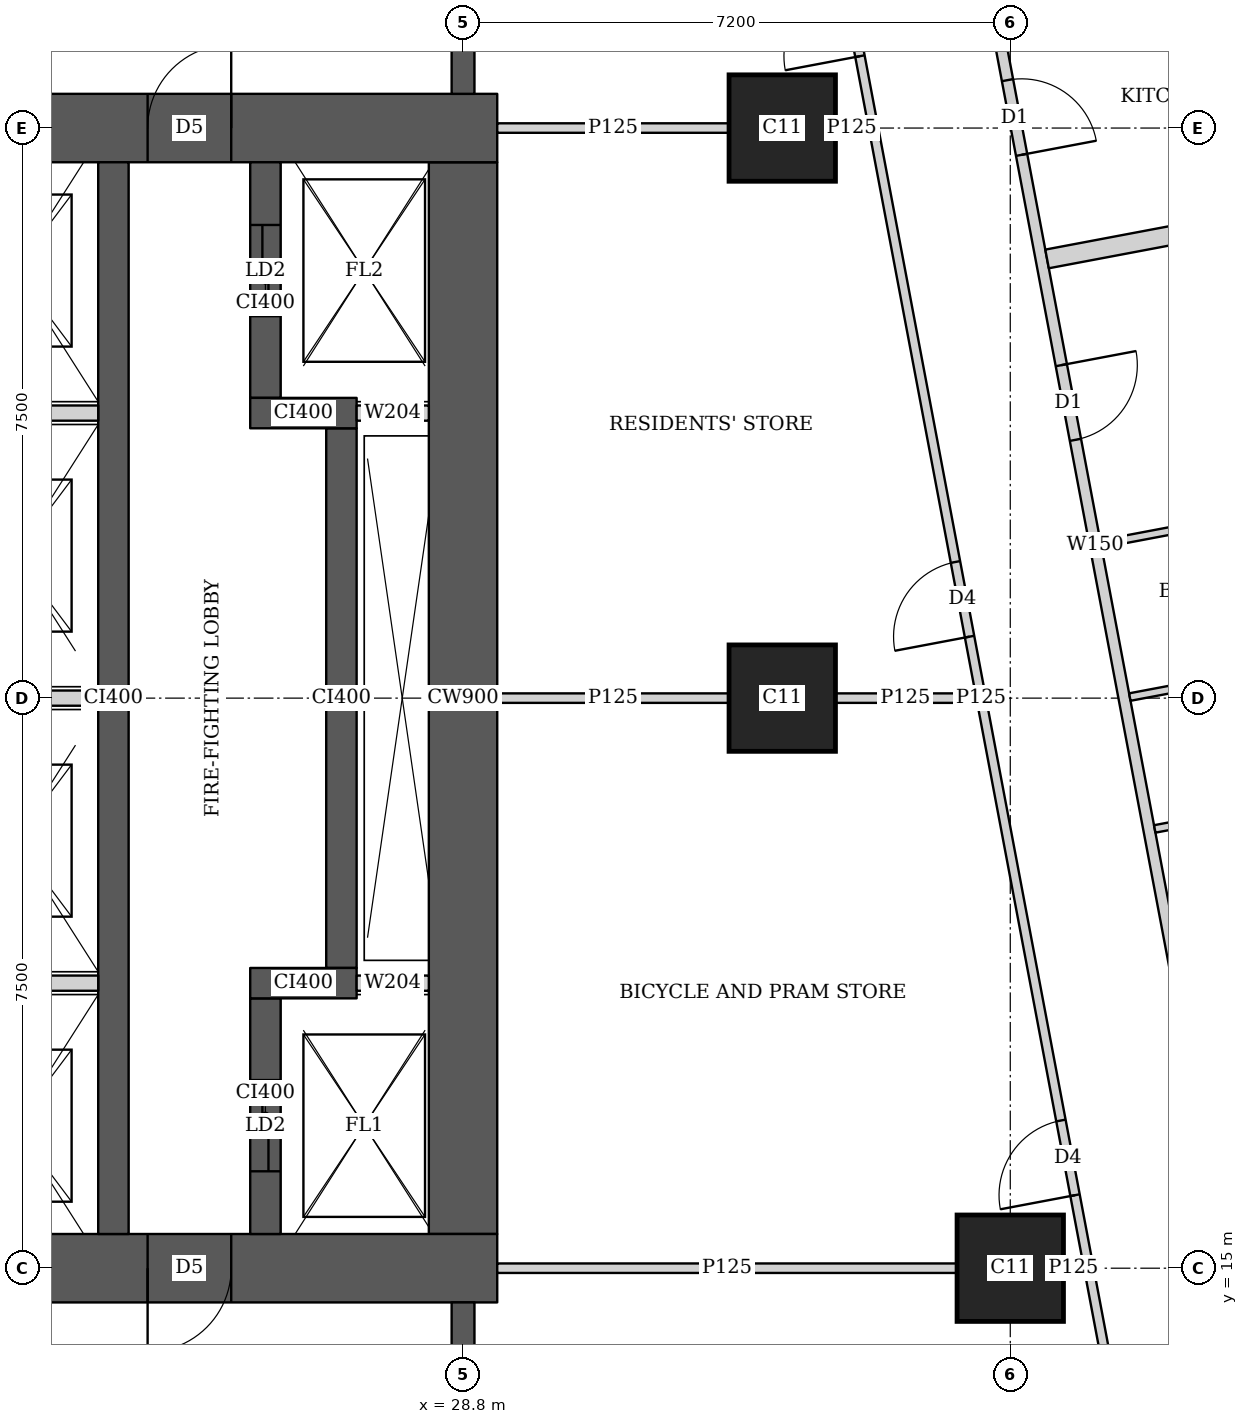
"""IFC4 building model, lengths in metres.
Left out: names, types, materials, properties, quantities, classifications, styles, units other than length and angle.
Written with IfcOpenShell. Run it as: python <this file> out.ifc"""

import sys

from ifc_helpers import new_model, si_unit, direction, frame, frame_2d, origin, origin_2d, place, context, subcontext, project, spatial, rectangle, extrude, element, fill, save


model = new_model("IFC4")
c1 = context("Model", 3, precision=1e-05, world=origin(), true_north=direction((0.0, 1.0)))
c2 = subcontext(c1, "Body", "Model", "MODEL_VIEW")
j1 = project(units=[si_unit("LENGTHUNIT", "METRE"), si_unit("PLANEANGLEUNIT", "RADIAN")], contexts=[c1])
p1 = place(None, origin())
s1 = spatial("IfcSite", under=j1, at=p1, CompositionType="ELEMENT")
p2 = place(p1, origin())
s2 = spatial("IfcBuilding", under=s1, at=p2, CompositionType="ELEMENT")
p3 = place(p2, frame((0.0, 0.0, 277.85)))
s3 = spatial("IfcBuildingStorey", under=s2, at=p3, CompositionType="ELEMENT", Elevation=277.85)
for number, where, z_axis, x_axis in (
    (1, (36.0, 15.0, 0.0), (0.0, 0.0, 1.0), (1.0, 0.0, 0.0)),
    (2, (33.0, 22.5, 0.0), (0.0, 0.0, 1.0), (1.0, 0.0, 0.0)),
    (3, (33.0, 30.0, 0.0), (0.0, 0.0, 1.0), (1.0, 0.0, 0.0)),
):
    element("IfcColumn", number, at=place(p3, frame(where, z_axis=z_axis, x_axis=x_axis)), inside=s3, PredefinedType="COLUMN", context=c2, shape_type="SweptSolid", body=[
        extrude(rectangle(XDim=1.4, YDim=1.4, at=origin_2d()), origin(), (0.0, 0.0, 1.0), 3.75),
    ])
p4 = place(p3, frame((13.95, 15.0, 0.0), z_axis=(0.0, 0.0, 1.0), x_axis=(1.0, 0.0, 0.0)))
e4 = element("IfcWall", 4, at=p4, inside=s3, PredefinedType="SHEAR", context=c2, shape_type="SweptSolid", body=[
    extrude(rectangle(XDim=15.3, YDim=0.9, at=frame_2d((7.65, 0.0))), origin(), (0.0, 0.0, 1.0), 3.75),
])
p5 = place(p4, frame((4.45, 0.0, 0.0)))
e5 = element("IfcOpeningElement", 5, at=p5, cuts=e4, PredefinedType="OPENING", context=c2, shape_type="SweptSolid", body=[
    extrude(rectangle(XDim=1.8, YDim=2.1, at=frame_2d((0.9, 1.05))), frame((0.0, 0.46, 0.0), z_axis=(0.0, -1.0, 0.0), x_axis=(1.0, 0.0, 0.0)), (0.0, 0.0, 1.0), 0.92),
])
p6 = place(p4, frame((10.7, 0.0, 0.0)))
e6 = element("IfcOpeningElement", 6, at=p6, cuts=e4, PredefinedType="OPENING", context=c2, shape_type="SweptSolid", body=[
    extrude(rectangle(XDim=1.1, YDim=2.1, at=frame_2d((0.55, 1.05))), frame((0.0, 0.46, 0.0), z_axis=(0.0, -1.0, 0.0), x_axis=(1.0, 0.0, 0.0)), (0.0, 0.0, 1.0), 0.92),
])
p7 = place(p3, frame((13.95, 30.0, 0.0), z_axis=(0.0, 0.0, 1.0), x_axis=(1.0, 0.0, 0.0)))
e7 = element("IfcWall", 7, at=p7, inside=s3, PredefinedType="SHEAR", context=c2, shape_type="SweptSolid", body=[
    extrude(rectangle(XDim=15.3, YDim=0.9, at=frame_2d((7.65, 0.0))), origin(), (0.0, 0.0, 1.0), 3.75),
])
p8 = place(p7, frame((4.45, 0.0, 0.0)))
e8 = element("IfcOpeningElement", 8, at=p8, cuts=e7, PredefinedType="OPENING", context=c2, shape_type="SweptSolid", body=[
    extrude(rectangle(XDim=1.8, YDim=2.1, at=frame_2d((0.9, 1.05))), frame((0.0, 0.46, 0.0), z_axis=(0.0, -1.0, 0.0), x_axis=(1.0, 0.0, 0.0)), (0.0, 0.0, 1.0), 0.92),
])
p9 = place(p7, frame((10.7, 0.0, 0.0)))
e9 = element("IfcOpeningElement", 9, at=p9, cuts=e7, PredefinedType="OPENING", context=c2, shape_type="SweptSolid", body=[
    extrude(rectangle(XDim=1.1, YDim=2.1, at=frame_2d((0.55, 1.05))), frame((0.0, 0.46, 0.0), z_axis=(0.0, -1.0, 0.0), x_axis=(1.0, 0.0, 0.0)), (0.0, 0.0, 1.0), 0.92),
])
p10 = place(p3, frame((28.8, 15.45, 0.0), z_axis=(0.0, 0.0, 1.0), x_axis=(0.0, 1.0, 0.0)))
e10 = element("IfcWall", 10, at=p10, inside=s3, PredefinedType="SHEAR", context=c2, shape_type="SweptSolid", body=[
    extrude(rectangle(XDim=14.1, YDim=0.9, at=frame_2d((7.05, 0.0))), origin(), (0.0, 0.0, 1.0), 3.75),
])
p11 = place(p3, frame((24.2, 15.45, 0.0), z_axis=(0.0, 0.0, 1.0), x_axis=(0.0, 1.0, 0.0)))
e11 = element("IfcWall", 11, at=p11, inside=s3, PredefinedType="SHEAR", context=c2, shape_type="SweptSolid", body=[
    extrude(rectangle(XDim=14.1, YDim=0.4, at=frame_2d((7.05, 0.0))), origin(), (0.0, 0.0, 1.0), 3.75),
])
p12 = place(p3, frame((26.2, 15.45, 0.0), z_axis=(0.0, 0.0, 1.0), x_axis=(0.0, 1.0, 0.0)))
e12 = element("IfcWall", 12, at=p12, inside=s3, PredefinedType="SHEAR", context=c2, shape_type="SweptSolid", body=[
    extrude(rectangle(XDim=3.1, YDim=0.4, at=frame_2d((1.55, 0.0))), origin(), (0.0, 0.0, 1.0), 3.75),
])
p13 = place(p12, frame((0.825, 0.0, 0.0)))
e13 = element("IfcOpeningElement", 13, at=p13, cuts=e12, PredefinedType="OPENING", context=c2, shape_type="SweptSolid", body=[
    extrude(rectangle(XDim=1.2, YDim=2.1, at=frame_2d((0.6, 1.05))), frame((0.0, 0.21, 0.0), z_axis=(0.0, -1.0, 0.0), x_axis=(1.0, 0.0, 0.0)), (0.0, 0.0, 1.0), 0.42),
])
p14 = place(p3, frame((26.0, 18.75, 0.0), z_axis=(0.0, 0.0, 1.0), x_axis=(1.0, 0.0, 0.0)))
e14 = element("IfcWall", 14, at=p14, inside=s3, PredefinedType="SHEAR", context=c2, shape_type="SweptSolid", body=[
    extrude(rectangle(XDim=1.4, YDim=0.4, at=frame_2d((0.7, 0.0))), origin(), (0.0, 0.0, 1.0), 3.75),
])
p15 = place(p3, frame((27.2, 18.95, 0.0), z_axis=(0.0, 0.0, 1.0), x_axis=(0.0, 1.0, 0.0)))
e15 = element("IfcWall", 15, at=p15, inside=s3, PredefinedType="SHEAR", context=c2, shape_type="SweptSolid", body=[
    extrude(rectangle(XDim=7.1, YDim=0.4, at=frame_2d((3.55, 0.0))), origin(), (0.0, 0.0, 1.0), 3.75),
])
p16 = place(p3, frame((26.0, 26.25, 0.0), z_axis=(0.0, 0.0, 1.0), x_axis=(1.0, 0.0, 0.0)))
e16 = element("IfcWall", 16, at=p16, inside=s3, PredefinedType="SHEAR", context=c2, shape_type="SweptSolid", body=[
    extrude(rectangle(XDim=1.4, YDim=0.4, at=frame_2d((0.7, 0.0))), origin(), (0.0, 0.0, 1.0), 3.75),
])
p17 = place(p3, frame((26.2, 26.45, 0.0), z_axis=(0.0, 0.0, 1.0), x_axis=(0.0, 1.0, 0.0)))
e17 = element("IfcWall", 17, at=p17, inside=s3, PredefinedType="SHEAR", context=c2, shape_type="SweptSolid", body=[
    extrude(rectangle(XDim=3.1, YDim=0.4, at=frame_2d((1.55, 0.0))), origin(), (0.0, 0.0, 1.0), 3.75),
])
p18 = place(p17, frame((1.075, 0.0, 0.0)))
e18 = element("IfcOpeningElement", 18, at=p18, cuts=e17, PredefinedType="OPENING", context=c2, shape_type="SweptSolid", body=[
    extrude(rectangle(XDim=1.2, YDim=2.1, at=frame_2d((0.6, 1.05))), frame((0.0, 0.21, 0.0), z_axis=(0.0, -1.0, 0.0), x_axis=(1.0, 0.0, 0.0)), (0.0, 0.0, 1.0), 0.42),
])
for number, where, z_axis, x_axis in (
    (19, (28.8, 10.35, 0.0), (0.0, 0.0, 1.0), (0.0, 1.0, 0.0)),
    (20, (28.8, 30.45, 0.0), (0.0, 0.0, 1.0), (0.0, 1.0, 0.0)),
):
    element("IfcWall", number, at=place(p3, frame(where, z_axis=z_axis, x_axis=x_axis)), inside=s3, PredefinedType="SHEAR", context=c2, shape_type="SweptSolid", body=[
        extrude(rectangle(XDim=4.2, YDim=0.3, at=frame_2d((2.1, 0.0))), origin(), (0.0, 0.0, 1.0), 3.75),
    ])
p19 = place(p3, frame((33.781, 42.186, 0.0), z_axis=(0.0, 0.0, 1.0), x_axis=(0.185593518645, -0.9826266055, 0.0)))
e21 = element("IfcWall", 21, at=p19, inside=s3, PredefinedType="SOLIDWALL", context=c2, shape_type="SweptSolid", body=[
    extrude(rectangle(XDim=35.961, YDim=0.15, at=frame_2d((17.98, 0.0))), origin(), (0.0, 0.0, 1.0), 2.5),
])
p20 = place(p19, frame((11.76, 0.0, 0.0)))
e22 = element("IfcOpeningElement", 22, at=p20, cuts=e21, PredefinedType="OPENING", context=c2, shape_type="SweptSolid", body=[
    extrude(rectangle(XDim=1.0, YDim=2.1, at=frame_2d((0.5, 1.05))), frame((0.0, 0.085, 0.0), z_axis=(0.0, -1.0, 0.0), x_axis=(1.0, 0.0, 0.0)), (0.0, 0.0, 1.0), 0.17),
])
p21 = place(p19, frame((15.576, 0.0, 0.0)))
e23 = element("IfcOpeningElement", 23, at=p21, cuts=e21, PredefinedType="OPENING", context=c2, shape_type="SweptSolid", body=[
    extrude(rectangle(XDim=1.0, YDim=2.1, at=frame_2d((0.5, 1.05))), frame((0.0, 0.085, 0.0), z_axis=(0.0, -1.0, 0.0), x_axis=(1.0, 0.0, 0.0)), (0.0, 0.0, 1.0), 0.17),
])
p22 = place(p19, frame((30.502, 0.0, 0.0)))
e24 = element("IfcOpeningElement", 24, at=p22, cuts=e21, PredefinedType="OPENING", context=c2, shape_type="SweptSolid", body=[
    extrude(rectangle(XDim=1.0, YDim=2.1, at=frame_2d((0.5, 1.05))), frame((0.0, 0.085, 0.0), z_axis=(0.0, -1.0, 0.0), x_axis=(1.0, 0.0, 0.0)), (0.0, 0.0, 1.0), 0.17),
])
p23 = place(p3, frame((40.657, 25.183, 0.0), z_axis=(0.0, 0.0, 1.0), x_axis=(-0.982585626838, -0.185810349366, 0.0)))
e25 = element("IfcWall", 25, at=p23, inside=s3, PredefinedType="PARTITIONING", context=c2, shape_type="SweptSolid", body=[
    extrude(rectangle(XDim=3.525, YDim=0.1, at=frame_2d((1.763, 0.0))), origin(), (0.0, 0.0, 1.0), 3.5),
])
p24 = place(p3, frame((41.365, 21.433, 0.0), z_axis=(0.0, 0.0, 1.0), x_axis=(-0.982638553676, -0.185530247748, 0.0)))
e26 = element("IfcWall", 26, at=p24, inside=s3, PredefinedType="PARTITIONING", context=c2, shape_type="SweptSolid", body=[
    extrude(rectangle(XDim=3.525, YDim=0.1, at=frame_2d((1.763, 0.0))), origin(), (0.0, 0.0, 1.0), 3.5),
])
p25 = place(p3, frame((41.037, 23.168, 0.0), z_axis=(0.0, 0.0, 1.0), x_axis=(-0.982638553676, -0.185530247748, 0.0)))
e27 = element("IfcWall", 27, at=p25, inside=s3, PredefinedType="PARTITIONING", context=c2, shape_type="SweptSolid", body=[
    extrude(rectangle(XDim=3.525, YDim=0.1, at=frame_2d((1.763, 0.0))), origin(), (0.0, 0.0, 1.0), 2.5),
])
p26 = place(p3, frame((41.177, 29.164, 0.0), z_axis=(0.0, 0.0, 1.0), x_axis=(-0.982642846239, -0.185507511263, 0.0)))
e28 = element("IfcWall", 28, at=p26, inside=s3, PredefinedType="SOLIDWALL", context=c2, shape_type="SweptSolid", body=[
    extrude(rectangle(XDim=4.776, YDim=0.25, at=frame_2d((2.388, 0.0))), origin(), (0.0, 0.0, 1.0), 2.5),
])
p27 = place(p3, frame((37.947, 10.163, 0.0), z_axis=(0.0, 0.0, 1.0), x_axis=(-0.185572770922, 0.982630523998, 0.0)))
e29 = element("IfcWall", 29, at=p27, inside=s3, PredefinedType="PARTITIONING", context=c2, shape_type="SweptSolid", body=[
    extrude(rectangle(XDim=25.111, YDim=0.125, at=frame_2d((12.556, 0.0))), origin(), (0.0, 0.0, 1.0), 2.5),
])
p28 = place(p27, frame((0.708, 0.0, 0.0)))
e30 = element("IfcOpeningElement", 30, at=p28, cuts=e29, PredefinedType="OPENING", context=c2, shape_type="SweptSolid", body=[
    extrude(rectangle(XDim=1.0, YDim=2.1, at=frame_2d((0.5, 1.05))), frame((0.0, 0.073, 0.0), z_axis=(0.0, -1.0, 0.0), x_axis=(1.0, 0.0, 0.0)), (0.0, 0.0, 1.0), 0.145),
])
p29 = place(p27, frame((5.9, 0.0, 0.0)))
e31 = element("IfcOpeningElement", 31, at=p29, cuts=e29, PredefinedType="OPENING", context=c2, shape_type="SweptSolid", body=[
    extrude(rectangle(XDim=1.0, YDim=2.1, at=frame_2d((0.5, 1.05))), frame((0.0, 0.073, 0.0), z_axis=(0.0, -1.0, 0.0), x_axis=(1.0, 0.0, 0.0)), (0.0, 0.0, 1.0), 0.145),
])
p30 = place(p27, frame((13.378, 0.0, 0.0)))
e32 = element("IfcOpeningElement", 32, at=p30, cuts=e29, PredefinedType="OPENING", context=c2, shape_type="SweptSolid", body=[
    extrude(rectangle(XDim=1.0, YDim=2.1, at=frame_2d((0.5, 1.05))), frame((0.0, 0.073, 0.0), z_axis=(0.0, -1.0, 0.0), x_axis=(1.0, 0.0, 0.0)), (0.0, 0.0, 1.0), 0.145),
])
p31 = place(p27, frame((21.15, 0.0, 0.0)))
e33 = element("IfcOpeningElement", 33, at=p31, cuts=e29, PredefinedType="OPENING", context=c2, shape_type="SweptSolid", body=[
    extrude(rectangle(XDim=1.0, YDim=2.1, at=frame_2d((0.5, 1.05))), frame((0.0, 0.073, 0.0), z_axis=(0.0, -1.0, 0.0), x_axis=(1.0, 0.0, 0.0)), (0.0, 0.0, 1.0), 0.145),
])
p32 = place(p3, frame((29.25, 15.0, 0.0), z_axis=(0.0, 0.0, 1.0), x_axis=(1.0, 0.0, 0.0)))
e34 = element("IfcWall", 34, at=p32, inside=s3, PredefinedType="PARTITIONING", context=c2, shape_type="SweptSolid", body=[
    extrude(rectangle(XDim=6.049, YDim=0.125, at=frame_2d((3.024, 0.0))), origin(), (0.0, 0.0, 1.0), 3.5),
])
p33 = place(p3, frame((36.701, 15.0, 0.0), z_axis=(0.0, 0.0, 1.0), x_axis=(1.0, 0.0, 0.0)))
e35 = element("IfcWall", 35, at=p33, inside=s3, PredefinedType="PARTITIONING", context=c2, shape_type="SweptSolid", body=[
    extrude(rectangle(XDim=0.257, YDim=0.125, at=frame_2d((0.128, 0.0))), origin(), (0.0, 0.0, 1.0), 3.5),
])
p34 = place(p3, frame((29.25, 22.5, 0.0), z_axis=(0.0, 0.0, 1.0), x_axis=(1.0, 0.0, 0.0)))
e36 = element("IfcWall", 36, at=p34, inside=s3, PredefinedType="PARTITIONING", context=c2, shape_type="SweptSolid", body=[
    extrude(rectangle(XDim=3.049, YDim=0.125, at=frame_2d((1.524, 0.0))), origin(), (0.0, 0.0, 1.0), 3.5),
])
p35 = place(p3, frame((33.701, 22.5, 0.0), z_axis=(0.0, 0.0, 1.0), x_axis=(1.0, 0.0, 0.0)))
e37 = element("IfcWall", 37, at=p35, inside=s3, PredefinedType="PARTITIONING", context=c2, shape_type="SweptSolid", body=[
    extrude(rectangle(XDim=1.841, YDim=0.125, at=frame_2d((0.92, 0.0))), origin(), (0.0, 0.0, 1.0), 2.5),
])
p36 = place(p3, frame((29.25, 30.0, 0.0), z_axis=(0.0, 0.0, 1.0), x_axis=(1.0, 0.0, 0.0)))
e38 = element("IfcWall", 38, at=p36, inside=s3, PredefinedType="PARTITIONING", context=c2, shape_type="SweptSolid", body=[
    extrude(rectangle(XDim=3.049, YDim=0.125, at=frame_2d((1.524, 0.0))), origin(), (0.0, 0.0, 1.0), 3.5),
])
p37 = place(p3, frame((33.701, 30.0, 0.0), z_axis=(0.0, 0.0, 1.0), x_axis=(1.0, 0.0, 0.0)))
e39 = element("IfcWall", 39, at=p37, inside=s3, PredefinedType="PARTITIONING", context=c2, shape_type="SweptSolid", body=[
    extrude(rectangle(XDim=0.424, YDim=0.125, at=frame_2d((0.212, 0.0))), origin(), (0.0, 0.0, 1.0), 2.5),
])
for number, where, z_axis, x_axis in (
    (40, (21.8, 18.75, 0.0), (0.0, 0.0, 1.0), (1.0, 0.0, 0.0)),
    (41, (21.8, 22.5, 0.0), (0.0, 0.0, 1.0), (1.0, 0.0, 0.0)),
    (42, (21.8, 26.25, 0.0), (0.0, 0.0, 1.0), (1.0, 0.0, 0.0)),
):
    element("IfcWall", number, at=place(p3, frame(where, z_axis=z_axis, x_axis=x_axis)), inside=s3, PredefinedType="SOLIDWALL", context=c2, shape_type="SweptSolid", body=[
        extrude(rectangle(XDim=2.2, YDim=0.2, at=frame_2d((1.1, 0.0))), origin(), (0.0, 0.0, 1.0), 3.5),
    ])
for number, where, z_axis, x_axis in (
    (43, (27.4, 18.75, 0.0), (0.0, 0.0, 1.0), (1.0, 0.0, 0.0)),
    (44, (27.4, 26.25, 0.0), (0.0, 0.0, 1.0), (1.0, 0.0, 0.0)),
):
    element("IfcWall", number, at=place(p3, frame(where, z_axis=z_axis, x_axis=x_axis)), inside=s3, PredefinedType="SOLIDWALL", context=c2, shape_type="SweptSolid", body=[
        extrude(rectangle(XDim=0.95, YDim=0.2, at=frame_2d((0.475, 0.0))), origin(), (0.0, 0.0, 1.0), 3.5),
    ])
p38 = place(p20, origin())
e45 = element("IfcDoor", 45, at=p38, inside=s3, OperationType="SINGLE_SWING_RIGHT", PredefinedType="DOOR", context=c2, shape_type="SweptSolid", body=[
    extrude(rectangle(XDim=1.0, YDim=2.1, at=frame_2d((0.5, 1.05))), frame((0.0, 0.025, 0.0), z_axis=(0.0, -1.0, 0.0), x_axis=(1.0, 0.0, 0.0)), (0.0, 0.0, 1.0), 0.05),
])
fill(e22, e45)
p39 = place(p21, origin())
e46 = element("IfcDoor", 46, at=p39, inside=s3, OperationType="SINGLE_SWING_LEFT", PredefinedType="DOOR", context=c2, shape_type="SweptSolid", body=[
    extrude(rectangle(XDim=1.0, YDim=2.1, at=frame_2d((0.5, 1.05))), frame((0.0, 0.025, 0.0), z_axis=(0.0, -1.0, 0.0), x_axis=(1.0, 0.0, 0.0)), (0.0, 0.0, 1.0), 0.05),
])
fill(e23, e46)
p40 = place(p29, origin())
e47 = element("IfcDoor", 47, at=p40, inside=s3, OperationType="SINGLE_SWING_LEFT", PredefinedType="DOOR", context=c2, shape_type="SweptSolid", body=[
    extrude(rectangle(XDim=1.0, YDim=2.1, at=frame_2d((0.5, 1.05))), frame((0.0, 0.025, 0.0), z_axis=(0.0, -1.0, 0.0), x_axis=(1.0, 0.0, 0.0)), (0.0, 0.0, 1.0), 0.05),
])
fill(e31, e47)
p41 = place(p30, origin())
e48 = element("IfcDoor", 48, at=p41, inside=s3, OperationType="SINGLE_SWING_LEFT", PredefinedType="DOOR", context=c2, shape_type="SweptSolid", body=[
    extrude(rectangle(XDim=1.0, YDim=2.1, at=frame_2d((0.5, 1.05))), frame((0.0, 0.025, 0.0), z_axis=(0.0, -1.0, 0.0), x_axis=(1.0, 0.0, 0.0)), (0.0, 0.0, 1.0), 0.05),
])
fill(e32, e48)
p42 = place(p31, origin())
e49 = element("IfcDoor", 49, at=p42, inside=s3, OperationType="SINGLE_SWING_LEFT", PredefinedType="DOOR", context=c2, shape_type="SweptSolid", body=[
    extrude(rectangle(XDim=1.0, YDim=2.1, at=frame_2d((0.5, 1.05))), frame((0.0, 0.025, 0.0), z_axis=(0.0, -1.0, 0.0), x_axis=(1.0, 0.0, 0.0)), (0.0, 0.0, 1.0), 0.05),
])
fill(e33, e49)
p43 = place(p6, origin())
e50 = element("IfcDoor", 50, at=p43, inside=s3, OperationType="SINGLE_SWING_RIGHT", PredefinedType="DOOR", context=c2, shape_type="SweptSolid", body=[
    extrude(rectangle(XDim=1.1, YDim=2.1, at=frame_2d((0.55, 1.05))), frame((0.0, 0.025, 0.0), z_axis=(0.0, -1.0, 0.0), x_axis=(1.0, 0.0, 0.0)), (0.0, 0.0, 1.0), 0.05),
])
fill(e6, e50)
p44 = place(p9, origin())
e51 = element("IfcDoor", 51, at=p44, inside=s3, OperationType="SINGLE_SWING_RIGHT", PredefinedType="DOOR", context=c2, shape_type="SweptSolid", body=[
    extrude(rectangle(XDim=1.1, YDim=2.1, at=frame_2d((0.55, 1.05))), frame((0.0, 0.025, 0.0), z_axis=(0.0, -1.0, 0.0), x_axis=(1.0, 0.0, 0.0)), (0.0, 0.0, 1.0), 0.05),
])
fill(e9, e51)
p45 = place(p13, origin())
e52 = element("IfcDoor", 52, at=p45, inside=s3, OperationType="DOUBLE_DOOR_SLIDING", PredefinedType="DOOR", context=c2, shape_type="SweptSolid", body=[
    extrude(rectangle(XDim=1.2, YDim=2.1, at=frame_2d((0.6, 1.05))), frame((0.0, 0.025, 0.0), z_axis=(0.0, -1.0, 0.0), x_axis=(1.0, 0.0, 0.0)), (0.0, 0.0, 1.0), 0.05),
])
fill(e13, e52)
p46 = place(p18, origin())
e53 = element("IfcDoor", 53, at=p46, inside=s3, OperationType="DOUBLE_DOOR_SLIDING", PredefinedType="DOOR", context=c2, shape_type="SweptSolid", body=[
    extrude(rectangle(XDim=1.2, YDim=2.1, at=frame_2d((0.6, 1.05))), frame((0.0, 0.025, 0.0), z_axis=(0.0, -1.0, 0.0), x_axis=(1.0, 0.0, 0.0)), (0.0, 0.0, 1.0), 0.05),
])
fill(e18, e53)
save(model, sys.argv[1])
